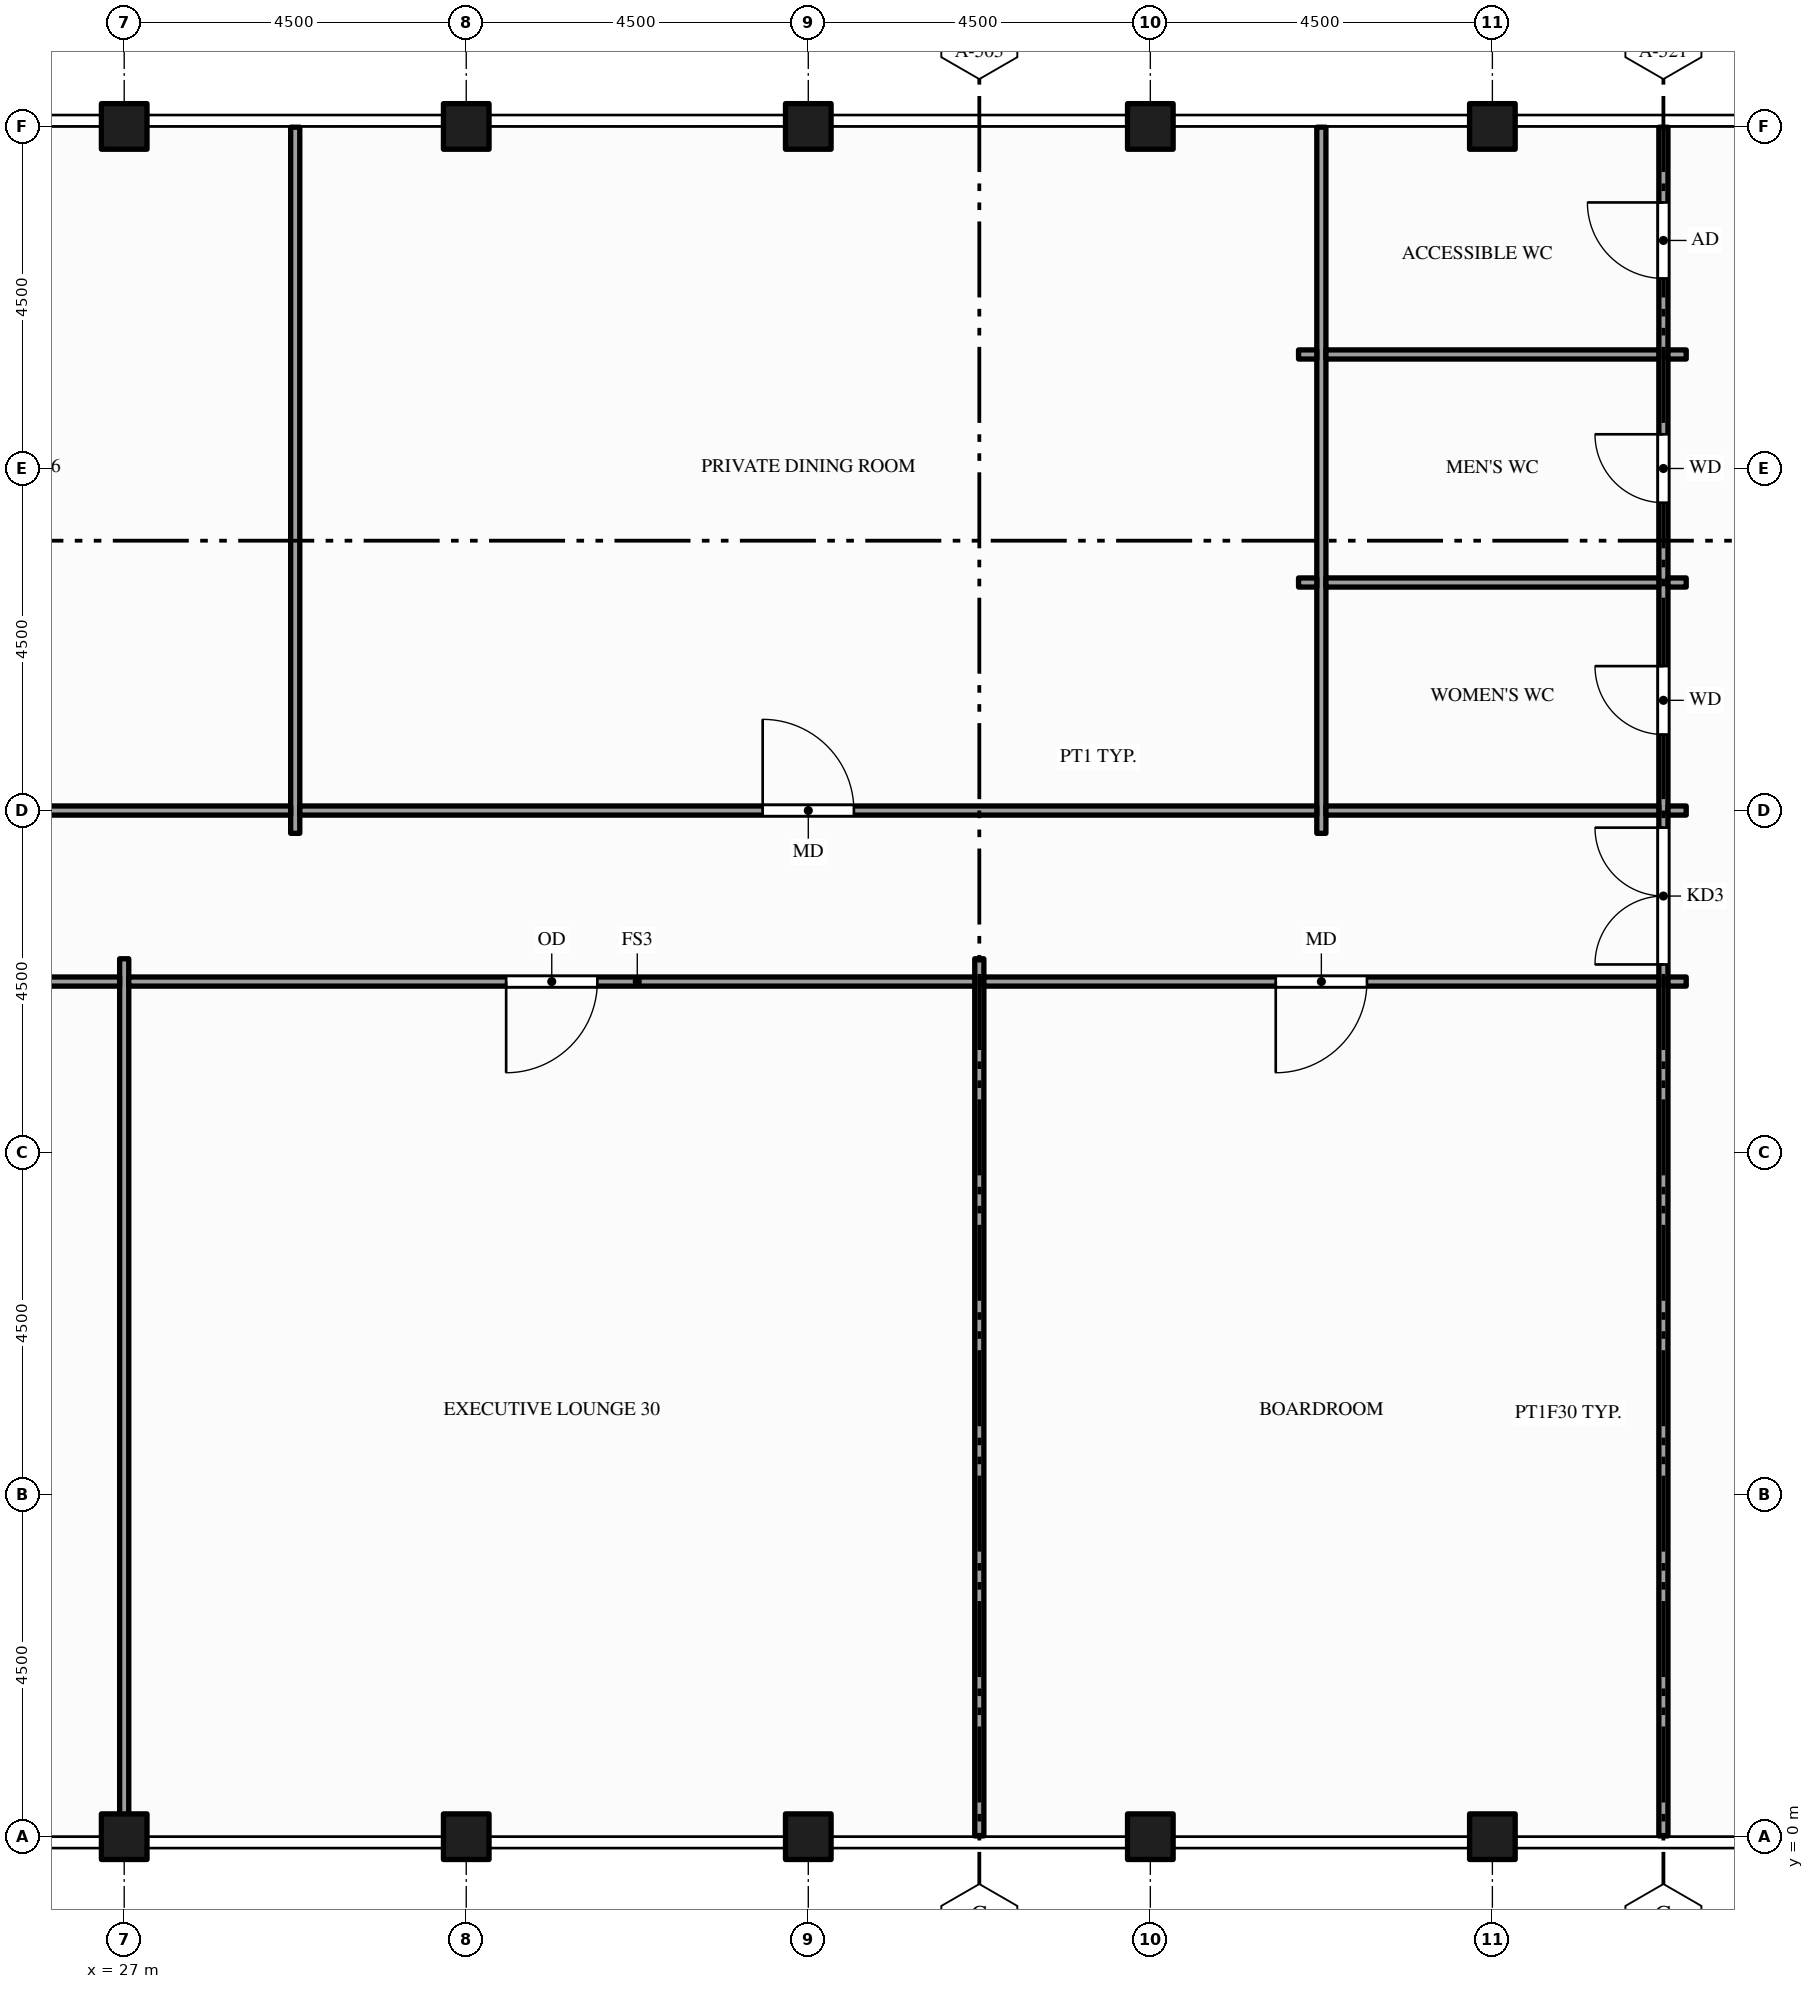
"""IFC4 building model, lengths in metres.
Left out: names, types, materials, properties, quantities, classifications, styles, units other than length and angle.
Written with IfcOpenShell. Run it as: python <this file> out.ifc"""

import sys

from ifc_helpers import new_model, si_unit, direction, frame, frame_2d, origin, origin_2d, place, context, subcontext, project, spatial, rectangle, hollow_rectangle, extrude, element, fill, save


model = new_model("IFC4")
c1 = context("Model", 3, precision=1e-05, world=origin(), true_north=direction((0.0, 1.0)))
c2 = subcontext(c1, "Body", "Model", "MODEL_VIEW")
j1 = project(units=[si_unit("LENGTHUNIT", "METRE"), si_unit("PLANEANGLEUNIT", "RADIAN")], contexts=[c1])
p1 = place(None, origin())
s1 = spatial("IfcSite", under=j1, at=p1, CompositionType="ELEMENT")
p2 = place(p1, origin())
s2 = spatial("IfcBuilding", under=s1, at=p2, CompositionType="ELEMENT")
p3 = place(p2, frame((0.0, 0.0, 323.0)))
s3 = spatial("IfcBuildingStorey", under=s2, at=p3, CompositionType="ELEMENT", Elevation=323.0)
for number, where, z_axis, x_axis in (
    (1, (27.0, 0.0, -0.15), (0.0, 0.0, 1.0), (1.0, 0.0, 0.0)),
    (2, (27.0, 22.5, -0.15), (0.0, 0.0, 1.0), (1.0, 0.0, 0.0)),
    (3, (31.5, 0.0, -0.15), (0.0, 0.0, 1.0), (1.0, 0.0, 0.0)),
    (4, (31.5, 22.5, -0.15), (0.0, 0.0, 1.0), (1.0, 0.0, 0.0)),
    (5, (36.0, 0.0, -0.15), (0.0, 0.0, 1.0), (1.0, 0.0, 0.0)),
    (6, (36.0, 22.5, -0.15), (0.0, 0.0, 1.0), (1.0, 0.0, 0.0)),
    (7, (40.5, 0.0, -0.15), (0.0, 0.0, 1.0), (1.0, 0.0, 0.0)),
    (8, (40.5, 22.5, -0.15), (0.0, 0.0, 1.0), (1.0, 0.0, 0.0)),
    (9, (45.0, 0.0, -0.15), (0.0, 0.0, 1.0), (1.0, 0.0, 0.0)),
    (10, (45.0, 22.5, -0.15), (0.0, 0.0, 1.0), (1.0, 0.0, 0.0)),
):
    element("IfcColumn", number, at=place(p3, frame(where, z_axis=z_axis, x_axis=x_axis)), inside=s3, PredefinedType="COLUMN", context=c2, shape_type="SweptSolid", body=[
        extrude(hollow_rectangle(XDim=0.6, YDim=0.6, WallThickness=0.03, at=origin_2d()), origin(), (0.0, 0.0, 1.0), 4.5),
    ])
p4 = place(p3, frame((27.0, 0.01, 0.0), z_axis=(0.0, 0.0, 1.0), x_axis=(0.0, 1.0, 0.0)))
e11 = element("IfcWall", 11, at=p4, inside=s3, PredefinedType="PARTITIONING", context=c2, shape_type="SweptSolid", body=[
    extrude(rectangle(XDim=11.54, YDim=0.12, at=frame_2d((5.77, 0.0))), origin(), (0.0, 0.0, 1.0), 3.359),
])
p5 = place(p3, frame((29.25, 13.2, 0.0), z_axis=(0.0, 0.0, 1.0), x_axis=(0.0, 1.0, 0.0)))
e12 = element("IfcWall", 12, at=p5, inside=s3, PredefinedType="PARTITIONING", context=c2, shape_type="SweptSolid", body=[
    extrude(rectangle(XDim=9.29, YDim=0.12, at=frame_2d((4.645, 0.0))), origin(), (0.0, 0.0, 1.0), 3.359),
])
p6 = place(p3, frame((38.25, 0.01, 0.0), z_axis=(0.0, 0.0, 1.0), x_axis=(0.0, 1.0, 0.0)))
e13 = element("IfcWall", 13, at=p6, inside=s3, PredefinedType="PARTITIONING", context=c2, shape_type="SweptSolid", body=[
    extrude(rectangle(XDim=11.54, YDim=0.12, at=frame_2d((5.77, 0.0))), origin(), (0.0, 0.0, 1.0), 3.359),
])
p7 = place(p3, frame((42.75, 13.2, 0.0), z_axis=(0.0, 0.0, 1.0), x_axis=(0.0, 1.0, 0.0)))
e14 = element("IfcWall", 14, at=p7, inside=s3, PredefinedType="PARTITIONING", context=c2, shape_type="SweptSolid", body=[
    extrude(rectangle(XDim=9.29, YDim=0.12, at=frame_2d((4.645, 0.0))), origin(), (0.0, 0.0, 1.0), 3.359),
])
p8 = place(p3, frame((47.25, 0.01, 0.0), z_axis=(0.0, 0.0, 1.0), x_axis=(0.0, 1.0, 0.0)))
e15 = element("IfcWall", 15, at=p8, inside=s3, PredefinedType="PARTITIONING", context=c2, shape_type="SweptSolid", body=[
    extrude(rectangle(XDim=22.48, YDim=0.12, at=frame_2d((11.24, 0.0))), origin(), (0.0, 0.0, 1.0), 3.359),
])
p9 = place(p8, frame((11.465, 0.0, 0.0)))
e16 = element("IfcOpeningElement", 16, at=p9, cuts=e15, PredefinedType="OPENING", context=c2, shape_type="SweptSolid", body=[
    extrude(rectangle(XDim=1.8, YDim=2.1, at=frame_2d((0.9, 1.05))), frame((0.0, 0.07, 0.0), z_axis=(0.0, -1.0, 0.0), x_axis=(1.0, 0.0, 0.0)), (0.0, 0.0, 1.0), 0.14),
])
p10 = place(p8, frame((14.49, 0.0, 0.0)))
e17 = element("IfcOpeningElement", 17, at=p10, cuts=e15, PredefinedType="OPENING", context=c2, shape_type="SweptSolid", body=[
    extrude(rectangle(XDim=0.9, YDim=2.1, at=frame_2d((0.45, 1.05))), frame((0.0, 0.07, 0.0), z_axis=(0.0, -1.0, 0.0), x_axis=(1.0, 0.0, 0.0)), (0.0, 0.0, 1.0), 0.14),
])
p11 = place(p8, frame((17.54, 0.0, 0.0)))
e18 = element("IfcOpeningElement", 18, at=p11, cuts=e15, PredefinedType="OPENING", context=c2, shape_type="SweptSolid", body=[
    extrude(rectangle(XDim=0.9, YDim=2.1, at=frame_2d((0.45, 1.05))), frame((0.0, 0.07, 0.0), z_axis=(0.0, -1.0, 0.0), x_axis=(1.0, 0.0, 0.0)), (0.0, 0.0, 1.0), 0.14),
])
p12 = place(p8, frame((20.49, 0.0, 0.0)))
e19 = element("IfcOpeningElement", 19, at=p12, cuts=e15, PredefinedType="OPENING", context=c2, shape_type="SweptSolid", body=[
    extrude(rectangle(XDim=1.0, YDim=2.1, at=frame_2d((0.5, 1.05))), frame((0.0, 0.07, 0.0), z_axis=(0.0, -1.0, 0.0), x_axis=(1.0, 0.0, 0.0)), (0.0, 0.0, 1.0), 0.14),
])
p13 = place(p3, frame((22.56, 11.25, 0.0), z_axis=(0.0, 0.0, 1.0), x_axis=(1.0, 0.0, 0.0)))
e20 = element("IfcWall", 20, at=p13, inside=s3, PredefinedType="PARTITIONING", context=c2, shape_type="SweptSolid", body=[
    extrude(rectangle(XDim=4.38, YDim=0.12, at=frame_2d((2.19, 0.0))), origin(), (0.0, 0.0, 1.0), 3.359),
])
p14 = place(p13, frame((1.69, 0.0, 0.0)))
e21 = element("IfcOpeningElement", 21, at=p14, cuts=e20, PredefinedType="OPENING", context=c2, shape_type="SweptSolid", body=[
    extrude(rectangle(XDim=1.0, YDim=2.1, at=frame_2d((0.5, 1.05))), frame((0.0, 0.07, 0.0), z_axis=(0.0, -1.0, 0.0), x_axis=(1.0, 0.0, 0.0)), (0.0, 0.0, 1.0), 0.14),
])
p15 = place(p3, frame((27.06, 11.25, 0.0), z_axis=(0.0, 0.0, 1.0), x_axis=(1.0, 0.0, 0.0)))
e22 = element("IfcWall", 22, at=p15, inside=s3, PredefinedType="PARTITIONING", context=c2, shape_type="SweptSolid", body=[
    extrude(rectangle(XDim=11.13, YDim=0.12, at=frame_2d((5.565, 0.0))), origin(), (0.0, 0.0, 1.0), 3.359),
])
p16 = place(p15, frame((4.965, 0.0, 0.0)))
e23 = element("IfcOpeningElement", 23, at=p16, cuts=e22, PredefinedType="OPENING", context=c2, shape_type="SweptSolid", body=[
    extrude(rectangle(XDim=1.2, YDim=2.1, at=frame_2d((0.6, 1.05))), frame((0.0, 0.07, 0.0), z_axis=(0.0, -1.0, 0.0), x_axis=(1.0, 0.0, 0.0)), (0.0, 0.0, 1.0), 0.14),
])
p17 = place(p3, frame((38.31, 11.25, 0.0), z_axis=(0.0, 0.0, 1.0), x_axis=(1.0, 0.0, 0.0)))
e24 = element("IfcWall", 24, at=p17, inside=s3, PredefinedType="PARTITIONING", context=c2, shape_type="SweptSolid", body=[
    extrude(rectangle(XDim=8.88, YDim=0.12, at=frame_2d((4.44, 0.0))), origin(), (0.0, 0.0, 1.0), 3.359),
])
p18 = place(p17, frame((3.84, 0.0, 0.0)))
e25 = element("IfcOpeningElement", 25, at=p18, cuts=e24, PredefinedType="OPENING", context=c2, shape_type="SweptSolid", body=[
    extrude(rectangle(XDim=1.2, YDim=2.1, at=frame_2d((0.6, 1.05))), frame((0.0, 0.07, 0.0), z_axis=(0.0, -1.0, 0.0), x_axis=(1.0, 0.0, 0.0)), (0.0, 0.0, 1.0), 0.14),
])
p19 = place(p3, frame((47.31, 11.25, 0.0), z_axis=(0.0, 0.0, 1.0), x_axis=(1.0, 0.0, 0.0)))
e26 = element("IfcWall", 26, at=p19, inside=s3, PredefinedType="PARTITIONING", context=c2, shape_type="SweptSolid", body=[
    extrude(rectangle(XDim=0.24, YDim=0.12, at=frame_2d((0.12, 0.0))), origin(), (0.0, 0.0, 1.0), 3.359),
])
p20 = place(p3, frame((20.31, 13.5, 0.0), z_axis=(0.0, 0.0, 1.0), x_axis=(1.0, 0.0, 0.0)))
e27 = element("IfcWall", 27, at=p20, inside=s3, PredefinedType="PARTITIONING", context=c2, shape_type="SweptSolid", body=[
    extrude(rectangle(XDim=8.88, YDim=0.12, at=frame_2d((4.44, 0.0))), origin(), (0.0, 0.0, 1.0), 3.359),
])
p21 = place(p20, frame((3.84, 0.0, 0.0)))
e28 = element("IfcOpeningElement", 28, at=p21, cuts=e27, PredefinedType="OPENING", context=c2, shape_type="SweptSolid", body=[
    extrude(rectangle(XDim=1.2, YDim=2.1, at=frame_2d((0.6, 1.05))), frame((0.0, 0.07, 0.0), z_axis=(0.0, -1.0, 0.0), x_axis=(1.0, 0.0, 0.0)), (0.0, 0.0, 1.0), 0.14),
])
p22 = place(p3, frame((29.31, 13.5, 0.0), z_axis=(0.0, 0.0, 1.0), x_axis=(1.0, 0.0, 0.0)))
e29 = element("IfcWall", 29, at=p22, inside=s3, PredefinedType="PARTITIONING", context=c2, shape_type="SweptSolid", body=[
    extrude(rectangle(XDim=13.38, YDim=0.12, at=frame_2d((6.69, 0.0))), origin(), (0.0, 0.0, 1.0), 3.359),
])
p23 = place(p22, frame((6.09, 0.0, 0.0)))
e30 = element("IfcOpeningElement", 30, at=p23, cuts=e29, PredefinedType="OPENING", context=c2, shape_type="SweptSolid", body=[
    extrude(rectangle(XDim=1.2, YDim=2.1, at=frame_2d((0.6, 1.05))), frame((0.0, 0.07, 0.0), z_axis=(0.0, -1.0, 0.0), x_axis=(1.0, 0.0, 0.0)), (0.0, 0.0, 1.0), 0.14),
])
p24 = place(p3, frame((42.81, 13.5, 0.0), z_axis=(0.0, 0.0, 1.0), x_axis=(1.0, 0.0, 0.0)))
e31 = element("IfcWall", 31, at=p24, inside=s3, PredefinedType="PARTITIONING", context=c2, shape_type="SweptSolid", body=[
    extrude(rectangle(XDim=4.38, YDim=0.12, at=frame_2d((2.19, 0.0))), origin(), (0.0, 0.0, 1.0), 3.359),
])
for number, where, z_axis, x_axis in (
    (32, (47.31, 13.5, 0.0), (0.0, 0.0, 1.0), (1.0, 0.0, 0.0)),
    (33, (42.45, 16.5, 0.0), (0.0, 0.0, 1.0), (1.0, 0.0, 0.0)),
):
    element("IfcWall", number, at=place(p3, frame(where, z_axis=z_axis, x_axis=x_axis)), inside=s3, PredefinedType="PARTITIONING", context=c2, shape_type="SweptSolid", body=[
        extrude(rectangle(XDim=0.24, YDim=0.12, at=frame_2d((0.12, 0.0))), origin(), (0.0, 0.0, 1.0), 3.359),
    ])
p25 = place(p3, frame((42.81, 16.5, 0.0), z_axis=(0.0, 0.0, 1.0), x_axis=(1.0, 0.0, 0.0)))
e34 = element("IfcWall", 34, at=p25, inside=s3, PredefinedType="PARTITIONING", context=c2, shape_type="SweptSolid", body=[
    extrude(rectangle(XDim=4.38, YDim=0.12, at=frame_2d((2.19, 0.0))), origin(), (0.0, 0.0, 1.0), 3.359),
])
for number, where, z_axis, x_axis in (
    (35, (47.31, 16.5, 0.0), (0.0, 0.0, 1.0), (1.0, 0.0, 0.0)),
    (36, (42.45, 19.5, 0.0), (0.0, 0.0, 1.0), (1.0, 0.0, 0.0)),
):
    element("IfcWall", number, at=place(p3, frame(where, z_axis=z_axis, x_axis=x_axis)), inside=s3, PredefinedType="PARTITIONING", context=c2, shape_type="SweptSolid", body=[
        extrude(rectangle(XDim=0.24, YDim=0.12, at=frame_2d((0.12, 0.0))), origin(), (0.0, 0.0, 1.0), 3.359),
    ])
p26 = place(p3, frame((42.81, 19.5, 0.0), z_axis=(0.0, 0.0, 1.0), x_axis=(1.0, 0.0, 0.0)))
e37 = element("IfcWall", 37, at=p26, inside=s3, PredefinedType="PARTITIONING", context=c2, shape_type="SweptSolid", body=[
    extrude(rectangle(XDim=4.38, YDim=0.12, at=frame_2d((2.19, 0.0))), origin(), (0.0, 0.0, 1.0), 3.359),
])
p27 = place(p3, frame((47.31, 19.5, 0.0), z_axis=(0.0, 0.0, 1.0), x_axis=(1.0, 0.0, 0.0)))
e38 = element("IfcWall", 38, at=p27, inside=s3, PredefinedType="PARTITIONING", context=c2, shape_type="SweptSolid", body=[
    extrude(rectangle(XDim=0.24, YDim=0.12, at=frame_2d((0.12, 0.0))), origin(), (0.0, 0.0, 1.0), 3.359),
])
p28 = place(p9, origin())
e39 = element("IfcDoor", 39, at=p28, inside=s3, OperationType="DOUBLE_DOOR_SINGLE_SWING", PredefinedType="DOOR", context=c2, shape_type="SweptSolid", body=[
    extrude(rectangle(XDim=1.8, YDim=2.1, at=frame_2d((0.9, 1.05))), frame((0.0, 0.025, 0.0), z_axis=(0.0, -1.0, 0.0), x_axis=(1.0, 0.0, 0.0)), (0.0, 0.0, 1.0), 0.05),
])
fill(e16, e39)
p29 = place(p16, origin())
e40 = element("IfcDoor", 40, at=p29, inside=s3, OperationType="SINGLE_SWING_LEFT", PredefinedType="DOOR", context=c2, shape_type="SweptSolid", body=[
    extrude(rectangle(XDim=1.2, YDim=2.1, at=frame_2d((0.6, 1.05))), frame((0.0, 0.025, 0.0), z_axis=(0.0, -1.0, 0.0), x_axis=(1.0, 0.0, 0.0)), (0.0, 0.0, 1.0), 0.05),
])
fill(e23, e40)
p30 = place(p18, origin())
e41 = element("IfcDoor", 41, at=p30, inside=s3, OperationType="SINGLE_SWING_LEFT", PredefinedType="DOOR", context=c2, shape_type="SweptSolid", body=[
    extrude(rectangle(XDim=1.2, YDim=2.1, at=frame_2d((0.6, 1.05))), frame((0.0, 0.025, 0.0), z_axis=(0.0, -1.0, 0.0), x_axis=(1.0, 0.0, 0.0)), (0.0, 0.0, 1.0), 0.05),
])
fill(e25, e41)
p31 = place(p23, origin())
e42 = element("IfcDoor", 42, at=p31, inside=s3, OperationType="SINGLE_SWING_LEFT", PredefinedType="DOOR", context=c2, shape_type="SweptSolid", body=[
    extrude(rectangle(XDim=1.2, YDim=2.1, at=frame_2d((0.6, 1.05))), frame((0.0, 0.025, 0.0), z_axis=(0.0, -1.0, 0.0), x_axis=(1.0, 0.0, 0.0)), (0.0, 0.0, 1.0), 0.05),
])
fill(e30, e42)
p32 = place(p10, origin())
e43 = element("IfcDoor", 43, at=p32, inside=s3, OperationType="SINGLE_SWING_RIGHT", PredefinedType="DOOR", context=c2, shape_type="SweptSolid", body=[
    extrude(rectangle(XDim=0.9, YDim=2.1, at=frame_2d((0.45, 1.05))), frame((0.0, 0.025, 0.0), z_axis=(0.0, -1.0, 0.0), x_axis=(1.0, 0.0, 0.0)), (0.0, 0.0, 1.0), 0.05),
])
fill(e17, e43)
p33 = place(p11, origin())
e44 = element("IfcDoor", 44, at=p33, inside=s3, OperationType="SINGLE_SWING_RIGHT", PredefinedType="DOOR", context=c2, shape_type="SweptSolid", body=[
    extrude(rectangle(XDim=0.9, YDim=2.1, at=frame_2d((0.45, 1.05))), frame((0.0, 0.025, 0.0), z_axis=(0.0, -1.0, 0.0), x_axis=(1.0, 0.0, 0.0)), (0.0, 0.0, 1.0), 0.05),
])
fill(e18, e44)
p34 = place(p12, origin())
e45 = element("IfcDoor", 45, at=p34, inside=s3, OperationType="SINGLE_SWING_RIGHT", PredefinedType="DOOR", context=c2, shape_type="SweptSolid", body=[
    extrude(rectangle(XDim=1.0, YDim=2.1, at=frame_2d((0.5, 1.05))), frame((0.0, 0.025, 0.0), z_axis=(0.0, -1.0, 0.0), x_axis=(1.0, 0.0, 0.0)), (0.0, 0.0, 1.0), 0.05),
])
fill(e19, e45)
save(model, sys.argv[1])
